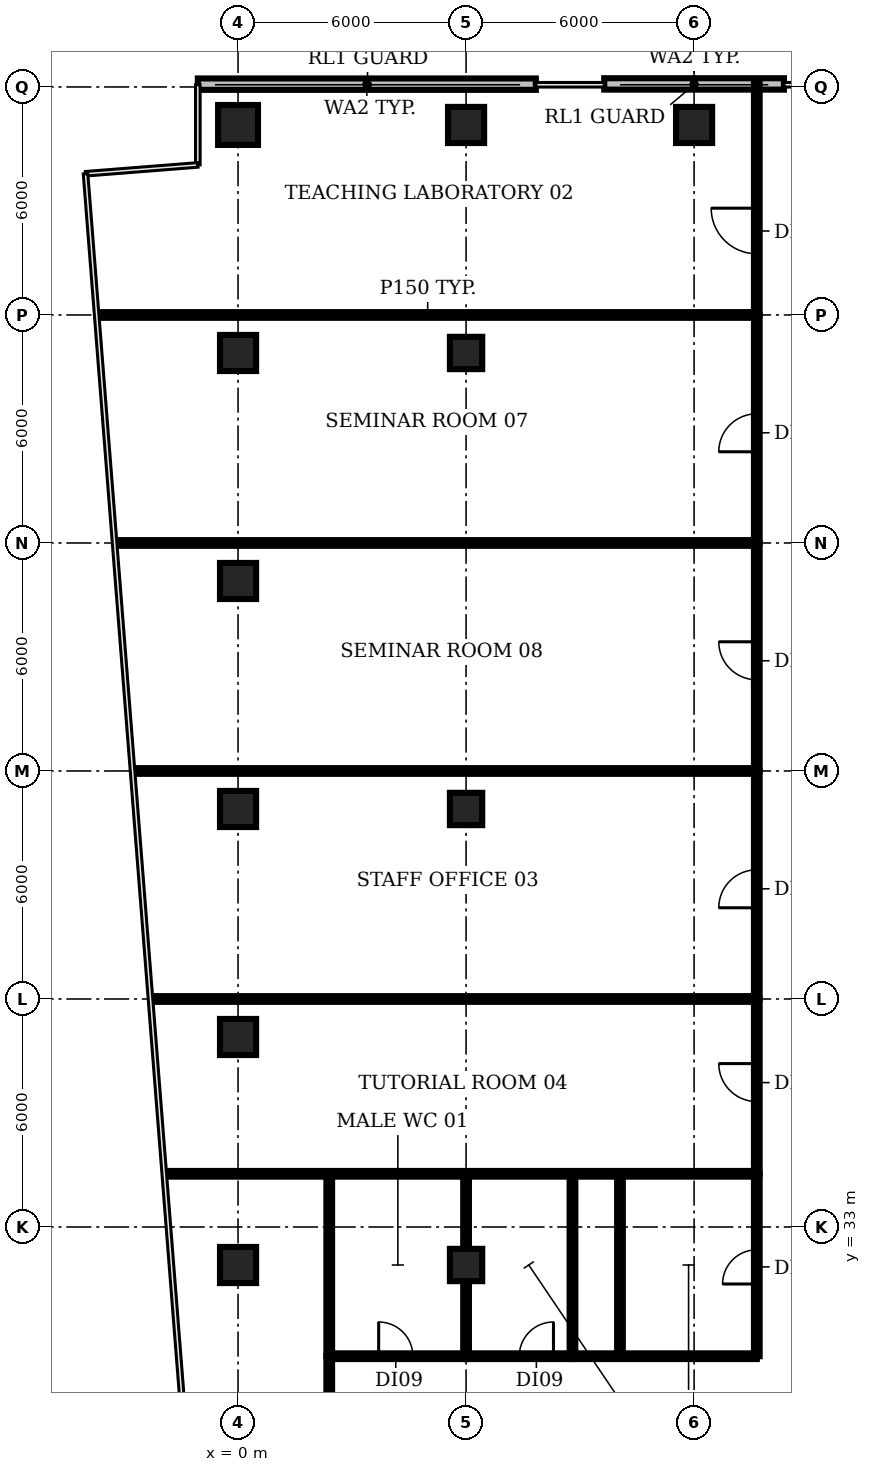
"""IFC4 building model, lengths in metres.
Left out: names, types, materials, properties, quantities, classifications, styles, units other than length and angle.
Written with IfcOpenShell. Run it as: python <this file> out.ifc"""

import sys

from ifc_helpers import new_model, si_unit, direction, frame, frame_2d, origin, origin_2d, place, context, subcontext, project, spatial, rectangle, circle, extrude, element, fill, save


model = new_model("IFC4")
c1 = context("Model", 3, precision=1e-05, world=origin(), true_north=direction((0.0, 1.0)))
c2 = subcontext(c1, "Body", "Model", "MODEL_VIEW")
j1 = project(units=[si_unit("LENGTHUNIT", "METRE"), si_unit("PLANEANGLEUNIT", "RADIAN")], contexts=[c1])
p1 = place(None, origin())
s1 = spatial("IfcSite", under=j1, at=p1, CompositionType="ELEMENT")
p2 = place(p1, origin())
s2 = spatial("IfcBuilding", under=s1, at=p2, CompositionType="ELEMENT")
p3 = place(p2, frame((0.0, 0.0, 71.0)))
s3 = spatial("IfcBuildingStorey", under=s2, at=p3, CompositionType="ELEMENT", Elevation=71.0)
for number, where, z_axis, x_axis in (
    (1, (0.0, 32.0, 0.0), (0.0, 0.0, 1.0), (1.0, 0.0, 0.0)),
    (2, (0.0, 38.0, 0.0), (0.0, 0.0, 1.0), (1.0, 0.0, 0.0)),
    (3, (0.0, 44.0, 0.0), (0.0, 0.0, 1.0), (1.0, 0.0, 0.0)),
    (4, (0.0, 50.0, 0.0), (0.0, 0.0, 1.0), (1.0, 0.0, 0.0)),
    (5, (0.0, 56.0, 0.0), (0.0, 0.0, 1.0), (1.0, 0.0, 0.0)),
):
    element("IfcColumn", number, at=place(p3, frame(where, z_axis=z_axis, x_axis=x_axis)), inside=s3, PredefinedType="COLUMN", context=c2, shape_type="SweptSolid", body=[
        extrude(rectangle(XDim=0.95, YDim=0.95, at=origin_2d()), origin(), (0.0, 0.0, 1.0), 3.85),
    ])
p4 = place(p3, frame((0.0, 62.0, 0.0), z_axis=(0.0, 0.0, 1.0), x_axis=(1.0, 0.0, 0.0)))
e6 = element("IfcColumn", 6, at=p4, inside=s3, PredefinedType="COLUMN", context=c2, shape_type="SweptSolid", body=[
    extrude(circle(Radius=0.525, at=origin_2d()), origin(), (0.0, 0.0, 1.0), 3.85),
])
for number, where, z_axis, x_axis in (
    (7, (6.0, 32.0, 0.0), (0.0, 0.0, 1.0), (1.0, 0.0, 0.0)),
    (8, (6.0, 44.0, 0.0), (0.0, 0.0, 1.0), (1.0, 0.0, 0.0)),
    (9, (6.0, 56.0, 0.0), (0.0, 0.0, 1.0), (1.0, 0.0, 0.0)),
):
    element("IfcColumn", number, at=place(p3, frame(where, z_axis=z_axis, x_axis=x_axis)), inside=s3, PredefinedType="COLUMN", context=c2, shape_type="SweptSolid", body=[
        extrude(rectangle(XDim=0.85, YDim=0.85, at=origin_2d()), origin(), (0.0, 0.0, 1.0), 3.85),
    ])
for number, where, z_axis, x_axis in (
    (10, (6.0, 62.0, 0.0), (0.0, 0.0, 1.0), (1.0, 0.0, 0.0)),
    (11, (12.0, 62.0, 0.0), (0.0, 0.0, 1.0), (1.0, 0.0, 0.0)),
):
    element("IfcColumn", number, at=place(p3, frame(where, z_axis=z_axis, x_axis=x_axis)), inside=s3, PredefinedType="COLUMN", context=c2, shape_type="SweptSolid", body=[
        extrude(rectangle(XDim=0.95, YDim=0.95, at=origin_2d()), origin(), (0.0, 0.0, 1.0), 3.85),
    ])
p5 = place(p3, frame((14.365, 63.08, 0.0), z_axis=(0.0, 0.0, 1.0), x_axis=(-1.0, 0.0, 0.0)))
e12 = element("IfcWall", 12, at=p5, inside=s3, PredefinedType="SOLIDWALL", context=c2, shape_type="SweptSolid", body=[
    extrude(rectangle(XDim=4.729, YDim=0.3, at=frame_2d((2.365, 0.0))), origin(), (0.0, 0.0, 1.0), 3.85),
])
p6 = place(p3, frame((7.835, 63.074, 0.0), z_axis=(0.0, 0.0, 1.0), x_axis=(-1.0, 0.0, 0.0)))
e13 = element("IfcWall", 13, at=p6, inside=s3, PredefinedType="SOLIDWALL", context=c2, shape_type="SweptSolid", body=[
    extrude(rectangle(XDim=8.894, YDim=0.3, at=frame_2d((4.447, 0.0))), origin(), (0.0, 0.0, 1.0), 3.85),
])
p7 = place(p3, frame((-3.67, 57.0, 0.0), z_axis=(0.0, 0.0, 1.0), x_axis=(1.0, 0.0, 0.0)))
e14 = element("IfcWall", 14, at=p7, inside=s3, PredefinedType="PARTITIONING", context=c2, shape_type="SweptSolid", body=[
    extrude(rectangle(XDim=17.32, YDim=0.15, at=frame_2d((8.66, 0.0))), origin(), (0.0, 0.0, 1.0), 2.83),
])
p8 = place(p3, frame((-3.2, 51.0, 0.0), z_axis=(0.0, 0.0, 1.0), x_axis=(1.0, 0.0, 0.0)))
e15 = element("IfcWall", 15, at=p8, inside=s3, PredefinedType="PARTITIONING", context=c2, shape_type="SweptSolid", body=[
    extrude(rectangle(XDim=16.85, YDim=0.15, at=frame_2d((8.425, 0.0))), origin(), (0.0, 0.0, 1.0), 2.83),
])
p9 = place(p3, frame((-2.73, 45.0, 0.0), z_axis=(0.0, 0.0, 1.0), x_axis=(1.0, 0.0, 0.0)))
e16 = element("IfcWall", 16, at=p9, inside=s3, PredefinedType="PARTITIONING", context=c2, shape_type="SweptSolid", body=[
    extrude(rectangle(XDim=16.38, YDim=0.15, at=frame_2d((8.19, 0.0))), origin(), (0.0, 0.0, 1.0), 2.83),
])
p10 = place(p3, frame((-2.25, 39.0, 0.0), z_axis=(0.0, 0.0, 1.0), x_axis=(1.0, 0.0, 0.0)))
e17 = element("IfcWall", 17, at=p10, inside=s3, PredefinedType="PARTITIONING", context=c2, shape_type="SweptSolid", body=[
    extrude(rectangle(XDim=15.9, YDim=0.15, at=frame_2d((7.95, 0.0))), origin(), (0.0, 0.0, 1.0), 2.83),
])
p11 = place(p3, frame((-1.89, 34.4, 0.0), z_axis=(0.0, 0.0, 1.0), x_axis=(1.0, 0.0, 0.0)))
e18 = element("IfcWall", 18, at=p11, inside=s3, PredefinedType="PARTITIONING", context=c2, shape_type="SweptSolid", body=[
    extrude(rectangle(XDim=15.54, YDim=0.15, at=frame_2d((7.77, 0.0))), origin(), (0.0, 0.0, 1.0), 2.83),
])
p12 = place(p3, frame((2.4, 25.7, 0.0), z_axis=(0.0, 0.0, 1.0), x_axis=(0.0, 1.0, 0.0)))
e19 = element("IfcWall", 19, at=p12, inside=s3, PredefinedType="PARTITIONING", context=c2, shape_type="SweptSolid", body=[
    extrude(rectangle(XDim=3.9, YDim=0.15, at=frame_2d((1.95, 0.0))), origin(), (0.0, 0.0, 1.0), 2.83),
])
p13 = place(p3, frame((2.4, 29.6, 0.0), z_axis=(0.0, 0.0, 1.0), x_axis=(0.0, 1.0, 0.0)))
e20 = element("IfcWall", 20, at=p13, inside=s3, PredefinedType="PARTITIONING", context=c2, shape_type="SweptSolid", body=[
    extrude(rectangle(XDim=4.8, YDim=0.15, at=frame_2d((2.4, 0.0))), origin(), (0.0, 0.0, 1.0), 2.83),
])
p14 = place(p3, frame((2.4, 29.6, 0.0), z_axis=(0.0, 0.0, 1.0), x_axis=(1.0, 0.0, 0.0)))
e21 = element("IfcWall", 21, at=p14, inside=s3, PredefinedType="PARTITIONING", context=c2, shape_type="SweptSolid", body=[
    extrude(rectangle(XDim=3.6, YDim=0.15, at=frame_2d((1.8, 0.0))), origin(), (0.0, 0.0, 1.0), 2.83),
])
p15 = place(p14, frame((1.3, 0.0, 0.0)))
e22 = element("IfcOpeningElement", 22, at=p15, cuts=e21, PredefinedType="OPENING", context=c2, shape_type="SweptSolid", body=[
    extrude(rectangle(XDim=0.9, YDim=2.1, at=frame_2d((0.45, 1.05))), frame((0.0, 0.085, 0.0), z_axis=(0.0, -1.0, 0.0), x_axis=(1.0, 0.0, 0.0)), (0.0, 0.0, 1.0), 0.17),
])
p16 = place(p3, frame((6.0, 29.6, 0.0), z_axis=(0.0, 0.0, 1.0), x_axis=(0.0, 1.0, 0.0)))
e23 = element("IfcWall", 23, at=p16, inside=s3, PredefinedType="PARTITIONING", context=c2, shape_type="SweptSolid", body=[
    extrude(rectangle(XDim=4.8, YDim=0.15, at=frame_2d((2.4, 0.0))), origin(), (0.0, 0.0, 1.0), 2.83),
])
p17 = place(p3, frame((6.0, 29.6, 0.0), z_axis=(0.0, 0.0, 1.0), x_axis=(1.0, 0.0, 0.0)))
e24 = element("IfcWall", 24, at=p17, inside=s3, PredefinedType="PARTITIONING", context=c2, shape_type="SweptSolid", body=[
    extrude(rectangle(XDim=2.8, YDim=0.15, at=frame_2d((1.4, 0.0))), origin(), (0.0, 0.0, 1.0), 2.83),
])
p18 = place(p17, frame((1.4, 0.0, 0.0)))
e25 = element("IfcOpeningElement", 25, at=p18, cuts=e24, PredefinedType="OPENING", context=c2, shape_type="SweptSolid", body=[
    extrude(rectangle(XDim=0.9, YDim=2.1, at=frame_2d((0.45, 1.05))), frame((0.0, 0.085, 0.0), z_axis=(0.0, -1.0, 0.0), x_axis=(1.0, 0.0, 0.0)), (0.0, 0.0, 1.0), 0.17),
])
p19 = place(p3, frame((8.8, 29.6, 0.0), z_axis=(0.0, 0.0, 1.0), x_axis=(0.0, 1.0, 0.0)))
e26 = element("IfcWall", 26, at=p19, inside=s3, PredefinedType="PARTITIONING", context=c2, shape_type="SweptSolid", body=[
    extrude(rectangle(XDim=4.8, YDim=0.15, at=frame_2d((2.4, 0.0))), origin(), (0.0, 0.0, 1.0), 2.83),
])
p20 = place(p3, frame((8.8, 29.6, 0.0), z_axis=(0.0, 0.0, 1.0), x_axis=(1.0, 0.0, 0.0)))
e27 = element("IfcWall", 27, at=p20, inside=s3, PredefinedType="PARTITIONING", context=c2, shape_type="SweptSolid", body=[
    extrude(rectangle(XDim=4.85, YDim=0.15, at=frame_2d((2.425, 0.0))), origin(), (0.0, 0.0, 1.0), 2.83),
])
p21 = place(p3, frame((10.05, 29.6, 0.0), z_axis=(0.0, 0.0, 1.0), x_axis=(0.0, 1.0, 0.0)))
e28 = element("IfcWall", 28, at=p21, inside=s3, PredefinedType="PARTITIONING", context=c2, shape_type="SweptSolid", body=[
    extrude(rectangle(XDim=4.8, YDim=0.15, at=frame_2d((2.4, 0.0))), origin(), (0.0, 0.0, 1.0), 2.83),
])
p22 = place(p3, frame((13.65, 29.6, 0.0), z_axis=(0.0, 0.0, 1.0), x_axis=(0.0, 1.0, 0.0)))
e29 = element("IfcWall", 29, at=p22, inside=s3, PredefinedType="PARTITIONING", context=c2, shape_type="SweptSolid", body=[
    extrude(rectangle(XDim=4.8, YDim=0.15, at=frame_2d((2.4, 0.0))), origin(), (0.0, 0.0, 1.0), 2.83),
])
p23 = place(p22, frame((1.9, 0.0, 0.0)))
e30 = element("IfcOpeningElement", 30, at=p23, cuts=e29, PredefinedType="OPENING", context=c2, shape_type="SweptSolid", body=[
    extrude(rectangle(XDim=0.9, YDim=2.1, at=frame_2d((0.45, 1.05))), frame((0.0, 0.085, 0.0), z_axis=(0.0, -1.0, 0.0), x_axis=(1.0, 0.0, 0.0)), (0.0, 0.0, 1.0), 0.17),
])
p24 = place(p3, frame((13.65, 34.4, 0.0), z_axis=(0.0, 0.0, 1.0), x_axis=(0.0, 1.0, 0.0)))
e31 = element("IfcWall", 31, at=p24, inside=s3, PredefinedType="PARTITIONING", context=c2, shape_type="SweptSolid", body=[
    extrude(rectangle(XDim=4.6, YDim=0.15, at=frame_2d((2.3, 0.0))), origin(), (0.0, 0.0, 1.0), 2.83),
])
p25 = place(p24, frame((1.9, 0.0, 0.0)))
e32 = element("IfcOpeningElement", 32, at=p25, cuts=e31, PredefinedType="OPENING", context=c2, shape_type="SweptSolid", body=[
    extrude(rectangle(XDim=1.0, YDim=2.1, at=frame_2d((0.5, 1.05))), frame((0.0, 0.085, 0.0), z_axis=(0.0, -1.0, 0.0), x_axis=(1.0, 0.0, 0.0)), (0.0, 0.0, 1.0), 0.17),
])
p26 = place(p3, frame((13.65, 39.0, 0.0), z_axis=(0.0, 0.0, 1.0), x_axis=(0.0, 1.0, 0.0)))
e33 = element("IfcWall", 33, at=p26, inside=s3, PredefinedType="PARTITIONING", context=c2, shape_type="SweptSolid", body=[
    extrude(rectangle(XDim=6.0, YDim=0.15, at=frame_2d((3.0, 0.0))), origin(), (0.0, 0.0, 1.0), 2.83),
])
p27 = place(p26, frame((2.4, 0.0, 0.0)))
e34 = element("IfcOpeningElement", 34, at=p27, cuts=e33, PredefinedType="OPENING", context=c2, shape_type="SweptSolid", body=[
    extrude(rectangle(XDim=1.0, YDim=2.1, at=frame_2d((0.5, 1.05))), frame((0.0, 0.085, 0.0), z_axis=(0.0, -1.0, 0.0), x_axis=(1.0, 0.0, 0.0)), (0.0, 0.0, 1.0), 0.17),
])
p28 = place(p3, frame((13.65, 45.0, 0.0), z_axis=(0.0, 0.0, 1.0), x_axis=(0.0, 1.0, 0.0)))
e35 = element("IfcWall", 35, at=p28, inside=s3, PredefinedType="PARTITIONING", context=c2, shape_type="SweptSolid", body=[
    extrude(rectangle(XDim=6.0, YDim=0.15, at=frame_2d((3.0, 0.0))), origin(), (0.0, 0.0, 1.0), 2.83),
])
p29 = place(p28, frame((2.4, 0.0, 0.0)))
e36 = element("IfcOpeningElement", 36, at=p29, cuts=e35, PredefinedType="OPENING", context=c2, shape_type="SweptSolid", body=[
    extrude(rectangle(XDim=1.0, YDim=2.1, at=frame_2d((0.5, 1.05))), frame((0.0, 0.085, 0.0), z_axis=(0.0, -1.0, 0.0), x_axis=(1.0, 0.0, 0.0)), (0.0, 0.0, 1.0), 0.17),
])
p30 = place(p3, frame((13.65, 51.0, 0.0), z_axis=(0.0, 0.0, 1.0), x_axis=(0.0, 1.0, 0.0)))
e37 = element("IfcWall", 37, at=p30, inside=s3, PredefinedType="PARTITIONING", context=c2, shape_type="SweptSolid", body=[
    extrude(rectangle(XDim=6.0, YDim=0.15, at=frame_2d((3.0, 0.0))), origin(), (0.0, 0.0, 1.0), 2.83),
])
p31 = place(p30, frame((2.4, 0.0, 0.0)))
e38 = element("IfcOpeningElement", 38, at=p31, cuts=e37, PredefinedType="OPENING", context=c2, shape_type="SweptSolid", body=[
    extrude(rectangle(XDim=1.0, YDim=2.1, at=frame_2d((0.5, 1.05))), frame((0.0, 0.085, 0.0), z_axis=(0.0, -1.0, 0.0), x_axis=(1.0, 0.0, 0.0)), (0.0, 0.0, 1.0), 0.17),
])
p32 = place(p3, frame((13.65, 57.0, 0.0), z_axis=(0.0, 0.0, 1.0), x_axis=(0.0, 1.0, 0.0)))
e39 = element("IfcWall", 39, at=p32, inside=s3, PredefinedType="PARTITIONING", context=c2, shape_type="SweptSolid", body=[
    extrude(rectangle(XDim=6.118, YDim=0.15, at=frame_2d((3.059, 0.0))), origin(), (0.0, 0.0, 1.0), 2.83),
])
p33 = place(p32, frame((1.61, 0.0, 0.0)))
e40 = element("IfcOpeningElement", 40, at=p33, cuts=e39, PredefinedType="OPENING", context=c2, shape_type="SweptSolid", body=[
    extrude(rectangle(XDim=1.2, YDim=2.1, at=frame_2d((0.6, 1.05))), frame((0.0, 0.085, 0.0), z_axis=(0.0, -1.0, 0.0), x_axis=(1.0, 0.0, 0.0)), (0.0, 0.0, 1.0), 0.17),
])
p34 = place(p15, origin())
e41 = element("IfcDoor", 41, at=p34, inside=s3, OperationType="SINGLE_SWING_LEFT", PredefinedType="DOOR", context=c2, shape_type="SweptSolid", body=[
    extrude(rectangle(XDim=0.9, YDim=2.1, at=frame_2d((0.45, 1.05))), frame((0.0, 0.025, 0.0), z_axis=(0.0, -1.0, 0.0), x_axis=(1.0, 0.0, 0.0)), (0.0, 0.0, 1.0), 0.05),
])
fill(e22, e41)
p35 = place(p18, origin())
e42 = element("IfcDoor", 42, at=p35, inside=s3, OperationType="SINGLE_SWING_RIGHT", PredefinedType="DOOR", context=c2, shape_type="SweptSolid", body=[
    extrude(rectangle(XDim=0.9, YDim=2.1, at=frame_2d((0.45, 1.05))), frame((0.0, 0.025, 0.0), z_axis=(0.0, -1.0, 0.0), x_axis=(1.0, 0.0, 0.0)), (0.0, 0.0, 1.0), 0.05),
])
fill(e25, e42)
p36 = place(p23, origin())
e43 = element("IfcDoor", 43, at=p36, inside=s3, OperationType="SINGLE_SWING_LEFT", PredefinedType="DOOR", context=c2, shape_type="SweptSolid", body=[
    extrude(rectangle(XDim=0.9, YDim=2.1, at=frame_2d((0.45, 1.05))), frame((0.0, 0.025, 0.0), z_axis=(0.0, -1.0, 0.0), x_axis=(1.0, 0.0, 0.0)), (0.0, 0.0, 1.0), 0.05),
])
fill(e30, e43)
p37 = place(p25, origin())
e44 = element("IfcDoor", 44, at=p37, inside=s3, OperationType="SINGLE_SWING_RIGHT", PredefinedType="DOOR", context=c2, shape_type="SweptSolid", body=[
    extrude(rectangle(XDim=1.0, YDim=2.1, at=frame_2d((0.5, 1.05))), frame((0.0, 0.025, 0.0), z_axis=(0.0, -1.0, 0.0), x_axis=(1.0, 0.0, 0.0)), (0.0, 0.0, 1.0), 0.05),
])
fill(e32, e44)
p38 = place(p27, origin())
e45 = element("IfcDoor", 45, at=p38, inside=s3, OperationType="SINGLE_SWING_LEFT", PredefinedType="DOOR", context=c2, shape_type="SweptSolid", body=[
    extrude(rectangle(XDim=1.0, YDim=2.1, at=frame_2d((0.5, 1.05))), frame((0.0, 0.025, 0.0), z_axis=(0.0, -1.0, 0.0), x_axis=(1.0, 0.0, 0.0)), (0.0, 0.0, 1.0), 0.05),
])
fill(e34, e45)
p39 = place(p29, origin())
e46 = element("IfcDoor", 46, at=p39, inside=s3, OperationType="SINGLE_SWING_RIGHT", PredefinedType="DOOR", context=c2, shape_type="SweptSolid", body=[
    extrude(rectangle(XDim=1.0, YDim=2.1, at=frame_2d((0.5, 1.05))), frame((0.0, 0.025, 0.0), z_axis=(0.0, -1.0, 0.0), x_axis=(1.0, 0.0, 0.0)), (0.0, 0.0, 1.0), 0.05),
])
fill(e36, e46)
p40 = place(p31, origin())
e47 = element("IfcDoor", 47, at=p40, inside=s3, OperationType="SINGLE_SWING_LEFT", PredefinedType="DOOR", context=c2, shape_type="SweptSolid", body=[
    extrude(rectangle(XDim=1.0, YDim=2.1, at=frame_2d((0.5, 1.05))), frame((0.0, 0.025, 0.0), z_axis=(0.0, -1.0, 0.0), x_axis=(1.0, 0.0, 0.0)), (0.0, 0.0, 1.0), 0.05),
])
fill(e38, e47)
p41 = place(p33, origin())
e48 = element("IfcDoor", 48, at=p41, inside=s3, OperationType="SINGLE_SWING_RIGHT", PredefinedType="DOOR", context=c2, shape_type="SweptSolid", body=[
    extrude(rectangle(XDim=1.2, YDim=2.1, at=frame_2d((0.6, 1.05))), frame((0.0, 0.025, 0.0), z_axis=(0.0, -1.0, 0.0), x_axis=(1.0, 0.0, 0.0)), (0.0, 0.0, 1.0), 0.05),
])
fill(e40, e48)
save(model, sys.argv[1])
